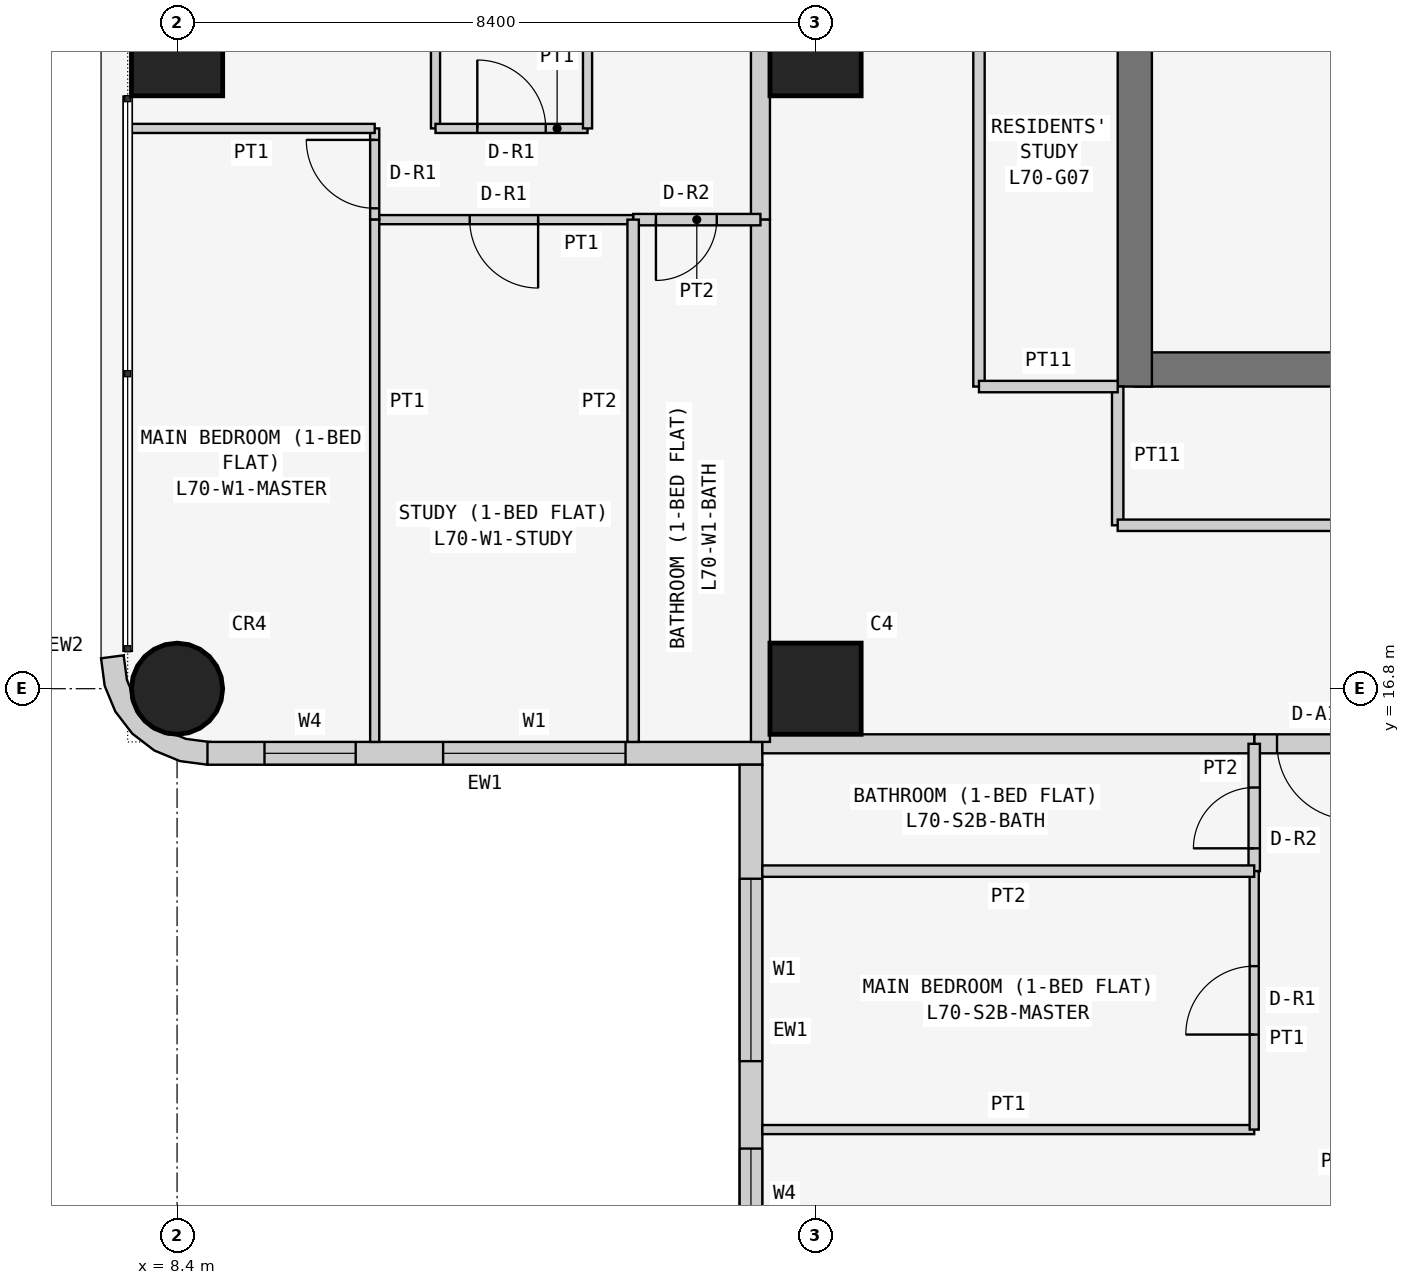
"""IFC4 building model, lengths in metres.
Left out: names, types, materials, properties, quantities, classifications, styles, units other than length and angle.
Written with IfcOpenShell. Run it as: python <this file> out.ifc"""

import sys

from ifc_helpers import new_model, si_unit, direction, frame, frame_2d, origin, origin_2d, place, context, subcontext, project, spatial, polyline, rectangle, circle, outline, extrude, element, fill, save


model = new_model("IFC4")
c1 = context("Model", 3, precision=1e-05, world=origin(), true_north=direction((0.0, 1.0)))
c2 = subcontext(c1, "Body", "Model", "MODEL_VIEW")
j1 = project(units=[si_unit("LENGTHUNIT", "METRE"), si_unit("PLANEANGLEUNIT", "RADIAN")], contexts=[c1])
p1 = place(None, origin())
s1 = spatial("IfcSite", under=j1, at=p1, CompositionType="ELEMENT")
p2 = place(p1, origin())
s2 = spatial("IfcBuilding", under=s1, at=p2, CompositionType="ELEMENT")
p3 = place(p2, frame((0.0, 0.0, 268.5)))
s3 = spatial("IfcBuildingStorey", under=s2, at=p3, CompositionType="ELEMENT", Elevation=268.5)
p4 = place(p3, frame((8.4, 16.8, 0.0), z_axis=(0.0, 0.0, 1.0), x_axis=(1.0, 0.0, 0.0)))
e1 = element("IfcColumn", 1, at=p4, inside=s3, PredefinedType="COLUMN", context=c2, shape_type="SweptSolid", body=[
    extrude(circle(Radius=0.6, at=origin_2d()), origin(), (0.0, 0.0, 1.0), 3.6),
])
for number, where, z_axis, x_axis in (
    (2, (8.4, 25.2, 0.0), (0.0, 0.0, 1.0), (1.0, 0.0, 0.0)),
    (3, (16.8, 16.8, 0.0), (0.0, 0.0, 1.0), (1.0, 0.0, 0.0)),
    (4, (16.8, 25.2, 0.0), (0.0, 0.0, 1.0), (1.0, 0.0, 0.0)),
):
    element("IfcColumn", number, at=place(p3, frame(where, z_axis=z_axis, x_axis=x_axis)), inside=s3, PredefinedType="COLUMN", context=c2, shape_type="SweptSolid", body=[
        extrude(rectangle(XDim=1.2, YDim=1.2, at=origin_2d()), origin(), (0.0, 0.0, 1.0), 3.6),
    ])
p5 = place(p3, frame((21.0, 21.0, 0.0), z_axis=(0.0, 0.0, 1.0), x_axis=(1.0, 0.0, 0.0)))
e5 = element("IfcWall", 5, at=p5, inside=s3, PredefinedType="SHEAR", context=c2, shape_type="SweptSolid", body=[
    extrude(rectangle(XDim=17.025, YDim=0.45, at=frame_2d((8.512, 0.0))), origin(), (0.0, 0.0, 1.0), 3.6),
])
p6 = place(p3, frame((21.0, 37.8, 0.0), z_axis=(0.0, 0.0, 1.0), x_axis=(0.0, -1.0, 0.0)))
e6 = element("IfcWall", 6, at=p6, inside=s3, PredefinedType="SHEAR", context=c2, shape_type="SweptSolid", body=[
    extrude(rectangle(XDim=17.025, YDim=0.45, at=frame_2d((8.513, 0.0))), origin(), (0.0, 0.0, 1.0), 3.6),
])
p7 = place(p6, frame((5.4, 0.0, 0.0)))
e7 = element("IfcOpeningElement", 7, at=p7, cuts=e6, PredefinedType="OPENING", context=c2, shape_type="SweptSolid", body=[
    extrude(rectangle(XDim=1.2, YDim=2.1, at=frame_2d((0.6, 1.05))), frame((0.0, 0.235, 0.0), z_axis=(0.0, -1.0, 0.0), x_axis=(1.0, 0.0, 0.0)), (0.0, 0.0, 1.0), 0.47),
])
p8 = place(p3, frame((8.8, 15.95, 0.0), z_axis=(0.0, 0.0, 1.0), x_axis=(1.0, 0.0, 0.0)))
e8 = element("IfcWall", 8, at=p8, inside=s3, PredefinedType="SOLIDWALL", context=c2, shape_type="SweptSolid", body=[
    extrude(rectangle(XDim=7.3, YDim=0.3, at=frame_2d((3.65, 0.0))), origin(), (0.0, 0.0, 1.0), 3.45),
])
p9 = place(p8, frame((3.1, 0.0, 0.9)))
e9 = element("IfcOpeningElement", 9, at=p9, cuts=e8, PredefinedType="OPENING", context=c2, shape_type="SweptSolid", body=[
    extrude(rectangle(XDim=2.4, YDim=1.5, at=frame_2d((1.2, 0.75))), frame((0.0, 0.16, 0.0), z_axis=(0.0, -1.0, 0.0), x_axis=(1.0, 0.0, 0.0)), (0.0, 0.0, 1.0), 0.32),
])
p10 = place(p8, frame((0.75, 0.0, 0.9)))
e10 = element("IfcOpeningElement", 10, at=p10, cuts=e8, PredefinedType="OPENING", context=c2, shape_type="SweptSolid", body=[
    extrude(rectangle(XDim=1.2, YDim=1.5, at=frame_2d((0.6, 0.75))), frame((0.0, 0.16, 0.0), z_axis=(0.0, -1.0, 0.0), x_axis=(1.0, 0.0, 0.0)), (0.0, 0.0, 1.0), 0.32),
])
p11 = place(p3, frame((15.95, 15.8, 0.0), z_axis=(0.0, 0.0, 1.0), x_axis=(0.0, -1.0, 0.0)))
e11 = element("IfcWall", 11, at=p11, inside=s3, PredefinedType="SOLIDWALL", context=c2, shape_type="SweptSolid", body=[
    extrude(rectangle(XDim=7.0, YDim=0.3, at=frame_2d((3.5, 0.0))), origin(), (0.0, 0.0, 1.0), 3.45),
])
p12 = place(p11, frame((1.5, 0.0, 0.9)))
e12 = element("IfcOpeningElement", 12, at=p12, cuts=e11, PredefinedType="OPENING", context=c2, shape_type="SweptSolid", body=[
    extrude(rectangle(XDim=2.4, YDim=1.5, at=frame_2d((1.2, 0.75))), frame((0.0, 0.16, 0.0), z_axis=(0.0, -1.0, 0.0), x_axis=(1.0, 0.0, 0.0)), (0.0, 0.0, 1.0), 0.32),
])
p13 = place(p11, frame((5.05, 0.0, 0.9)))
e13 = element("IfcOpeningElement", 13, at=p13, cuts=e11, PredefinedType="OPENING", context=c2, shape_type="SweptSolid", body=[
    extrude(rectangle(XDim=1.2, YDim=1.5, at=frame_2d((0.6, 0.75))), frame((0.0, 0.16, 0.0), z_axis=(0.0, -1.0, 0.0), x_axis=(1.0, 0.0, 0.0)), (0.0, 0.0, 1.0), 0.32),
])
p14 = place(p3, frame((7.824, 17.162, 0.0), z_axis=(0.0, 0.0, 1.0), x_axis=(-0.707106781187, -0.707106781187, 0.0)))
e14 = element("IfcWall", 14, at=p14, inside=s3, PredefinedType="SOLIDWALL", context=c2, shape_type="SweptSolid", body=[
    extrude(outline(polyline([(0.047, 1.454), (0.233, 1.212), (0.292, 1.069), (0.358, 1.003), (0.449, 0.782), (0.449, 0.543), (0.358, 0.323), (0.292, 0.257), (0.233, 0.114), (0.047, -0.129), (0.033, -0.143), (0.273, -0.327), (0.495, -0.037), (0.635, 0.301), (0.683, 0.663), (0.635, 1.025), (0.495, 1.363), (0.273, 1.653), (0.033, 1.469), (0.047, 1.454)])), origin(), (0.0, 0.0, 1.0), 3.45),
])
p15 = place(p3, frame((20.775, 20.775, 0.0), z_axis=(0.0, 0.0, 1.0), x_axis=(0.0, -1.0, 0.0)))
e15 = element("IfcWall", 15, at=p15, inside=s3, PredefinedType="PARTITIONING", context=c2, shape_type="SweptSolid", body=[
    extrude(rectangle(XDim=1.825, YDim=0.15, at=frame_2d((0.913, 0.0))), origin(), (0.0, 0.0, 1.0), 3.45),
])
p16 = place(p3, frame((20.775, 18.95, 0.0), z_axis=(0.0, 0.0, 1.0), x_axis=(1.0, 0.0, 0.0)))
e16 = element("IfcWall", 16, at=p16, inside=s3, PredefinedType="PARTITIONING", context=c2, shape_type="SweptSolid", body=[
    extrude(rectangle(XDim=11.925, YDim=0.15, at=frame_2d((5.962, 0.0))), origin(), (0.0, 0.0, 1.0), 3.45),
])
p17 = place(p16, frame((8.125, 0.0, 0.0)))
e17 = element("IfcOpeningElement", 17, at=p17, cuts=e16, PredefinedType="OPENING", context=c2, shape_type="SweptSolid", body=[
    extrude(rectangle(XDim=1.0, YDim=2.1, at=frame_2d((0.5, 1.05))), frame((0.0, 0.085, 0.0), z_axis=(0.0, -1.0, 0.0), x_axis=(1.0, 0.0, 0.0)), (0.0, 0.0, 1.0), 0.17),
])
p18 = place(p3, frame((18.95, 30.6, 0.0), z_axis=(0.0, 0.0, 1.0), x_axis=(0.0, -1.0, 0.0)))
e18 = element("IfcWall", 18, at=p18, inside=s3, PredefinedType="PARTITIONING", context=c2, shape_type="SweptSolid", body=[
    extrude(rectangle(XDim=9.825, YDim=0.15, at=frame_2d((4.913, 0.0))), origin(), (0.0, 0.0, 1.0), 3.45),
])
p19 = place(p18, frame((1.75, 0.0, 0.0)))
e19 = element("IfcOpeningElement", 19, at=p19, cuts=e18, PredefinedType="OPENING", context=c2, shape_type="SweptSolid", body=[
    extrude(rectangle(XDim=1.0, YDim=2.1, at=frame_2d((0.5, 1.05))), frame((0.0, 0.085, 0.0), z_axis=(0.0, -1.0, 0.0), x_axis=(1.0, 0.0, 0.0)), (0.0, 0.0, 1.0), 0.17),
])
p20 = place(p3, frame((18.95, 20.775, 0.0), z_axis=(0.0, 0.0, 1.0), x_axis=(1.0, 0.0, 0.0)))
e20 = element("IfcWall", 20, at=p20, inside=s3, PredefinedType="PARTITIONING", context=c2, shape_type="SweptSolid", body=[
    extrude(rectangle(XDim=1.825, YDim=0.15, at=frame_2d((0.913, 0.0))), origin(), (0.0, 0.0, 1.0), 3.45),
])
p21 = place(p3, frame((24.171, 16.075, 0.0), z_axis=(0.0, 0.0, 1.0), x_axis=(-1.0, 0.0, 0.0)))
e21 = element("IfcWall", 21, at=p21, inside=s3, PredefinedType="PARTITIONING", context=c2, shape_type="SweptSolid", body=[
    extrude(rectangle(XDim=1.6, YDim=0.25, at=frame_2d((0.8, 0.0))), origin(), (0.0, 0.0, 1.0), 3.45),
])
p22 = place(p21, frame((0.3, 0.0, 0.0)))
e22 = element("IfcOpeningElement", 22, at=p22, cuts=e21, PredefinedType="OPENING", context=c2, shape_type="SweptSolid", body=[
    extrude(rectangle(XDim=1.0, YDim=2.1, at=frame_2d((0.5, 1.05))), frame((0.0, 0.135, 0.0), z_axis=(0.0, -1.0, 0.0), x_axis=(1.0, 0.0, 0.0)), (0.0, 0.0, 1.0), 0.27),
])
p23 = place(p3, frame((22.571, 16.075, 0.0), z_axis=(0.0, 0.0, 1.0), x_axis=(-1.0, 0.0, 0.0)))
e23 = element("IfcWall", 23, at=p23, inside=s3, PredefinedType="PARTITIONING", context=c2, shape_type="SweptSolid", body=[
    extrude(rectangle(XDim=6.471, YDim=0.25, at=frame_2d((3.235, 0.0))), origin(), (0.0, 0.0, 1.0), 3.45),
])
p24 = place(p3, frame((16.075, 22.971, 0.0), z_axis=(0.0, 0.0, 1.0), x_axis=(0.0, 1.0, 0.0)))
e24 = element("IfcWall", 24, at=p24, inside=s3, PredefinedType="PARTITIONING", context=c2, shape_type="SweptSolid", body=[
    extrude(rectangle(XDim=6.429, YDim=0.25, at=frame_2d((3.214, 0.0))), origin(), (0.0, 0.0, 1.0), 3.45),
])
p25 = place(p24, frame((4.929, 0.0, 0.0)))
e25 = element("IfcOpeningElement", 25, at=p25, cuts=e24, PredefinedType="OPENING", context=c2, shape_type="SweptSolid", body=[
    extrude(rectangle(XDim=1.0, YDim=2.1, at=frame_2d((0.5, 1.05))), frame((0.0, 0.135, 0.0), z_axis=(0.0, -1.0, 0.0), x_axis=(1.0, 0.0, 0.0)), (0.0, 0.0, 1.0), 0.27),
])
p26 = place(p3, frame((16.075, 16.1, 0.0), z_axis=(0.0, 0.0, 1.0), x_axis=(0.0, 1.0, 0.0)))
e26 = element("IfcWall", 26, at=p26, inside=s3, PredefinedType="PARTITIONING", context=c2, shape_type="SweptSolid", body=[
    extrude(rectangle(XDim=6.871, YDim=0.25, at=frame_2d((3.436, 0.0))), origin(), (0.0, 0.0, 1.0), 3.45),
])
p27 = place(p3, frame((22.571, 14.4, 0.0), z_axis=(0.0, 0.0, 1.0), x_axis=(0.0, 1.0, 0.0)))
e27 = element("IfcWall", 27, at=p27, inside=s3, PredefinedType="PARTITIONING", context=c2, shape_type="SweptSolid", body=[
    extrude(rectangle(XDim=1.675, YDim=0.15, at=frame_2d((0.837, 0.0))), origin(), (0.0, 0.0, 1.0), 3.45),
])
p28 = place(p27, frame((0.3, 0.0, 0.0)))
e28 = element("IfcOpeningElement", 28, at=p28, cuts=e27, PredefinedType="OPENING", context=c2, shape_type="SweptSolid", body=[
    extrude(rectangle(XDim=0.8, YDim=2.1, at=frame_2d((0.4, 1.05))), frame((0.0, 0.085, 0.0), z_axis=(0.0, -1.0, 0.0), x_axis=(1.0, 0.0, 0.0)), (0.0, 0.0, 1.0), 0.17),
])
p29 = place(p3, frame((16.1, 11.0, 0.0), z_axis=(0.0, 0.0, 1.0), x_axis=(1.0, 0.0, 0.0)))
e29 = element("IfcWall", 29, at=p29, inside=s3, PredefinedType="PARTITIONING", context=c2, shape_type="SweptSolid", body=[
    extrude(rectangle(XDim=6.471, YDim=0.12, at=frame_2d((3.235, 0.0))), origin(), (0.0, 0.0, 1.0), 3.45),
])
p30 = place(p3, frame((22.571, 11.0, 0.0), z_axis=(0.0, 0.0, 1.0), x_axis=(0.0, 1.0, 0.0)))
e30 = element("IfcWall", 30, at=p30, inside=s3, PredefinedType="PARTITIONING", context=c2, shape_type="SweptSolid", body=[
    extrude(rectangle(XDim=3.4, YDim=0.12, at=frame_2d((1.7, 0.0))), origin(), (0.0, 0.0, 1.0), 3.45),
])
p31 = place(p30, frame((1.25, 0.0, 0.0)))
e31 = element("IfcOpeningElement", 31, at=p31, cuts=e30, PredefinedType="OPENING", context=c2, shape_type="SweptSolid", body=[
    extrude(rectangle(XDim=0.9, YDim=2.1, at=frame_2d((0.45, 1.05))), frame((0.0, 0.07, 0.0), z_axis=(0.0, -1.0, 0.0), x_axis=(1.0, 0.0, 0.0)), (0.0, 0.0, 1.0), 0.14),
])
p32 = place(p3, frame((22.571, 14.4, 0.0), z_axis=(0.0, 0.0, 1.0), x_axis=(-1.0, 0.0, 0.0)))
e32 = element("IfcWall", 32, at=p32, inside=s3, PredefinedType="PARTITIONING", context=c2, shape_type="SweptSolid", body=[
    extrude(rectangle(XDim=6.471, YDim=0.15, at=frame_2d((3.235, 0.0))), origin(), (0.0, 0.0, 1.0), 3.45),
])
p33 = place(p3, frame((11.8, 29.4, 0.0), z_axis=(0.0, 0.0, 1.0), x_axis=(0.0, -1.0, 0.0)))
e33 = element("IfcWall", 33, at=p33, inside=s3, PredefinedType="PARTITIONING", context=c2, shape_type="SweptSolid", body=[
    extrude(rectangle(XDim=5.229, YDim=0.12, at=frame_2d((2.615, 0.0))), origin(), (0.0, 0.0, 1.0), 3.45),
])
p34 = place(p3, frame((11.8, 24.171, 0.0), z_axis=(0.0, 0.0, 1.0), x_axis=(1.0, 0.0, 0.0)))
e34 = element("IfcWall", 34, at=p34, inside=s3, PredefinedType="PARTITIONING", context=c2, shape_type="SweptSolid", body=[
    extrude(rectangle(XDim=2.0, YDim=0.12, at=frame_2d((1.0, 0.0))), origin(), (0.0, 0.0, 1.0), 3.45),
])
p35 = place(p34, frame((0.55, 0.0, 0.0)))
e35 = element("IfcOpeningElement", 35, at=p35, cuts=e34, PredefinedType="OPENING", context=c2, shape_type="SweptSolid", body=[
    extrude(rectangle(XDim=0.9, YDim=2.1, at=frame_2d((0.45, 1.05))), frame((0.0, 0.07, 0.0), z_axis=(0.0, -1.0, 0.0), x_axis=(1.0, 0.0, 0.0)), (0.0, 0.0, 1.0), 0.14),
])
p36 = place(p3, frame((13.8, 24.171, 0.0), z_axis=(0.0, 0.0, 1.0), x_axis=(0.0, 1.0, 0.0)))
e36 = element("IfcWall", 36, at=p36, inside=s3, PredefinedType="PARTITIONING", context=c2, shape_type="SweptSolid", body=[
    extrude(rectangle(XDim=5.229, YDim=0.12, at=frame_2d((2.615, 0.0))), origin(), (0.0, 0.0, 1.0), 3.45),
])
p37 = place(p3, frame((16.075, 22.971, 0.0), z_axis=(0.0, 0.0, 1.0), x_axis=(-1.0, 0.0, 0.0)))
e37 = element("IfcWall", 37, at=p37, inside=s3, PredefinedType="PARTITIONING", context=c2, shape_type="SweptSolid", body=[
    extrude(rectangle(XDim=1.675, YDim=0.15, at=frame_2d((0.837, 0.0))), origin(), (0.0, 0.0, 1.0), 3.45),
])
p38 = place(p37, frame((0.575, 0.0, 0.0)))
e38 = element("IfcOpeningElement", 38, at=p38, cuts=e37, PredefinedType="OPENING", context=c2, shape_type="SweptSolid", body=[
    extrude(rectangle(XDim=0.8, YDim=2.1, at=frame_2d((0.4, 1.05))), frame((0.0, 0.085, 0.0), z_axis=(0.0, -1.0, 0.0), x_axis=(1.0, 0.0, 0.0)), (0.0, 0.0, 1.0), 0.17),
])
p39 = place(p3, frame((14.4, 22.971, 0.0), z_axis=(0.0, 0.0, 1.0), x_axis=(-1.0, 0.0, 0.0)))
e39 = element("IfcWall", 39, at=p39, inside=s3, PredefinedType="PARTITIONING", context=c2, shape_type="SweptSolid", body=[
    extrude(rectangle(XDim=3.4, YDim=0.12, at=frame_2d((1.7, 0.0))), origin(), (0.0, 0.0, 1.0), 3.45),
])
p40 = place(p39, frame((1.25, 0.0, 0.0)))
e40 = element("IfcOpeningElement", 40, at=p40, cuts=e39, PredefinedType="OPENING", context=c2, shape_type="SweptSolid", body=[
    extrude(rectangle(XDim=0.9, YDim=2.1, at=frame_2d((0.45, 1.05))), frame((0.0, 0.07, 0.0), z_axis=(0.0, -1.0, 0.0), x_axis=(1.0, 0.0, 0.0)), (0.0, 0.0, 1.0), 0.14),
])
p41 = place(p3, frame((11.0, 22.971, 0.0), z_axis=(0.0, 0.0, 1.0), x_axis=(0.0, 1.0, 0.0)))
e41 = element("IfcWall", 41, at=p41, inside=s3, PredefinedType="PARTITIONING", context=c2, shape_type="SweptSolid", body=[
    extrude(rectangle(XDim=1.2, YDim=0.12, at=frame_2d((0.6, 0.0))), origin(), (0.0, 0.0, 1.0), 3.45),
])
p42 = place(p41, frame((0.149, 0.0, 0.0)))
e42 = element("IfcOpeningElement", 42, at=p42, cuts=e41, PredefinedType="OPENING", context=c2, shape_type="SweptSolid", body=[
    extrude(rectangle(XDim=0.9, YDim=2.1, at=frame_2d((0.45, 1.05))), frame((0.0, 0.07, 0.0), z_axis=(0.0, -1.0, 0.0), x_axis=(1.0, 0.0, 0.0)), (0.0, 0.0, 1.0), 0.14),
])
p43 = place(p3, frame((11.0, 24.171, 0.0), z_axis=(0.0, 0.0, 1.0), x_axis=(-1.0, 0.0, 0.0)))
e43 = element("IfcWall", 43, at=p43, inside=s3, PredefinedType="PARTITIONING", context=c2, shape_type="SweptSolid", body=[
    extrude(rectangle(XDim=3.25, YDim=0.12, at=frame_2d((1.625, 0.0))), origin(), (0.0, 0.0, 1.0), 3.45),
])
p44 = place(p3, frame((14.4, 22.971, 0.0), z_axis=(0.0, 0.0, 1.0), x_axis=(0.0, -1.0, 0.0)))
e44 = element("IfcWall", 44, at=p44, inside=s3, PredefinedType="PARTITIONING", context=c2, shape_type="SweptSolid", body=[
    extrude(rectangle(XDim=6.871, YDim=0.15, at=frame_2d((3.436, 0.0))), origin(), (0.0, 0.0, 1.0), 3.45),
])
p45 = place(p3, frame((11.0, 22.971, 0.0), z_axis=(0.0, 0.0, 1.0), x_axis=(0.0, -1.0, 0.0)))
e45 = element("IfcWall", 45, at=p45, inside=s3, PredefinedType="PARTITIONING", context=c2, shape_type="SweptSolid", body=[
    extrude(rectangle(XDim=6.871, YDim=0.12, at=frame_2d((3.436, 0.0))), origin(), (0.0, 0.0, 1.0), 3.45),
])
p46 = place(p12, origin())
e46 = element("IfcWindow", 46, at=p46, inside=s3, PartitioningType="SINGLE_PANEL", PredefinedType="WINDOW", context=c2, shape_type="SweptSolid", body=[
    extrude(rectangle(XDim=2.4, YDim=1.5, at=frame_2d((1.2, 0.75))), frame((0.0, 0.03, 0.0), z_axis=(0.0, -1.0, 0.0), x_axis=(1.0, 0.0, 0.0)), (0.0, 0.0, 1.0), 0.06),
])
fill(e12, e46)
p47 = place(p13, origin())
e47 = element("IfcWindow", 47, at=p47, inside=s3, PartitioningType="SINGLE_PANEL", PredefinedType="WINDOW", context=c2, shape_type="SweptSolid", body=[
    extrude(rectangle(XDim=1.2, YDim=1.5, at=frame_2d((0.6, 0.75))), frame((0.0, 0.03, 0.0), z_axis=(0.0, -1.0, 0.0), x_axis=(1.0, 0.0, 0.0)), (0.0, 0.0, 1.0), 0.06),
])
fill(e13, e47)
p48 = place(p9, origin())
e48 = element("IfcWindow", 48, at=p48, inside=s3, PartitioningType="SINGLE_PANEL", PredefinedType="WINDOW", context=c2, shape_type="SweptSolid", body=[
    extrude(rectangle(XDim=2.4, YDim=1.5, at=frame_2d((1.2, 0.75))), frame((0.0, 0.03, 0.0), z_axis=(0.0, -1.0, 0.0), x_axis=(1.0, 0.0, 0.0)), (0.0, 0.0, 1.0), 0.06),
])
fill(e9, e48)
p49 = place(p10, origin())
e49 = element("IfcWindow", 49, at=p49, inside=s3, PartitioningType="SINGLE_PANEL", PredefinedType="WINDOW", context=c2, shape_type="SweptSolid", body=[
    extrude(rectangle(XDim=1.2, YDim=1.5, at=frame_2d((0.6, 0.75))), frame((0.0, 0.03, 0.0), z_axis=(0.0, -1.0, 0.0), x_axis=(1.0, 0.0, 0.0)), (0.0, 0.0, 1.0), 0.06),
])
fill(e10, e49)
p50 = place(p22, origin())
e50 = element("IfcDoor", 50, at=p50, inside=s3, OperationType="SINGLE_SWING_LEFT", PredefinedType="DOOR", context=c2, shape_type="SweptSolid", body=[
    extrude(rectangle(XDim=1.0, YDim=2.1, at=frame_2d((0.5, 1.05))), frame((0.0, 0.025, 0.0), z_axis=(0.0, -1.0, 0.0), x_axis=(1.0, 0.0, 0.0)), (0.0, 0.0, 1.0), 0.05),
])
fill(e22, e50)
p51 = place(p28, origin())
e51 = element("IfcDoor", 51, at=p51, inside=s3, OperationType="SINGLE_SWING_LEFT", PredefinedType="DOOR", context=c2, shape_type="SweptSolid", body=[
    extrude(rectangle(XDim=0.8, YDim=2.1, at=frame_2d((0.4, 1.05))), frame((0.0, 0.025, 0.0), z_axis=(0.0, -1.0, 0.0), x_axis=(1.0, 0.0, 0.0)), (0.0, 0.0, 1.0), 0.05),
])
fill(e28, e51)
p52 = place(p31, origin())
e52 = element("IfcDoor", 52, at=p52, inside=s3, OperationType="SINGLE_SWING_LEFT", PredefinedType="DOOR", context=c2, shape_type="SweptSolid", body=[
    extrude(rectangle(XDim=0.9, YDim=2.1, at=frame_2d((0.45, 1.05))), frame((0.0, 0.025, 0.0), z_axis=(0.0, -1.0, 0.0), x_axis=(1.0, 0.0, 0.0)), (0.0, 0.0, 1.0), 0.05),
])
fill(e31, e52)
p53 = place(p35, origin())
e53 = element("IfcDoor", 53, at=p53, inside=s3, OperationType="SINGLE_SWING_LEFT", PredefinedType="DOOR", context=c2, shape_type="SweptSolid", body=[
    extrude(rectangle(XDim=0.9, YDim=2.1, at=frame_2d((0.45, 1.05))), frame((0.0, 0.025, 0.0), z_axis=(0.0, -1.0, 0.0), x_axis=(1.0, 0.0, 0.0)), (0.0, 0.0, 1.0), 0.05),
])
fill(e35, e53)
p54 = place(p38, origin())
e54 = element("IfcDoor", 54, at=p54, inside=s3, OperationType="SINGLE_SWING_RIGHT", PredefinedType="DOOR", context=c2, shape_type="SweptSolid", body=[
    extrude(rectangle(XDim=0.8, YDim=2.1, at=frame_2d((0.4, 1.05))), frame((0.0, 0.025, 0.0), z_axis=(0.0, -1.0, 0.0), x_axis=(1.0, 0.0, 0.0)), (0.0, 0.0, 1.0), 0.05),
])
fill(e38, e54)
p55 = place(p40, origin())
e55 = element("IfcDoor", 55, at=p55, inside=s3, OperationType="SINGLE_SWING_LEFT", PredefinedType="DOOR", context=c2, shape_type="SweptSolid", body=[
    extrude(rectangle(XDim=0.9, YDim=2.1, at=frame_2d((0.45, 1.05))), frame((0.0, 0.025, 0.0), z_axis=(0.0, -1.0, 0.0), x_axis=(1.0, 0.0, 0.0)), (0.0, 0.0, 1.0), 0.05),
])
fill(e40, e55)
p56 = place(p42, origin())
e56 = element("IfcDoor", 56, at=p56, inside=s3, OperationType="SINGLE_SWING_RIGHT", PredefinedType="DOOR", context=c2, shape_type="SweptSolid", body=[
    extrude(rectangle(XDim=0.9, YDim=2.1, at=frame_2d((0.45, 1.05))), frame((0.0, 0.025, 0.0), z_axis=(0.0, -1.0, 0.0), x_axis=(1.0, 0.0, 0.0)), (0.0, 0.0, 1.0), 0.05),
])
fill(e42, e56)
save(model, sys.argv[1])
